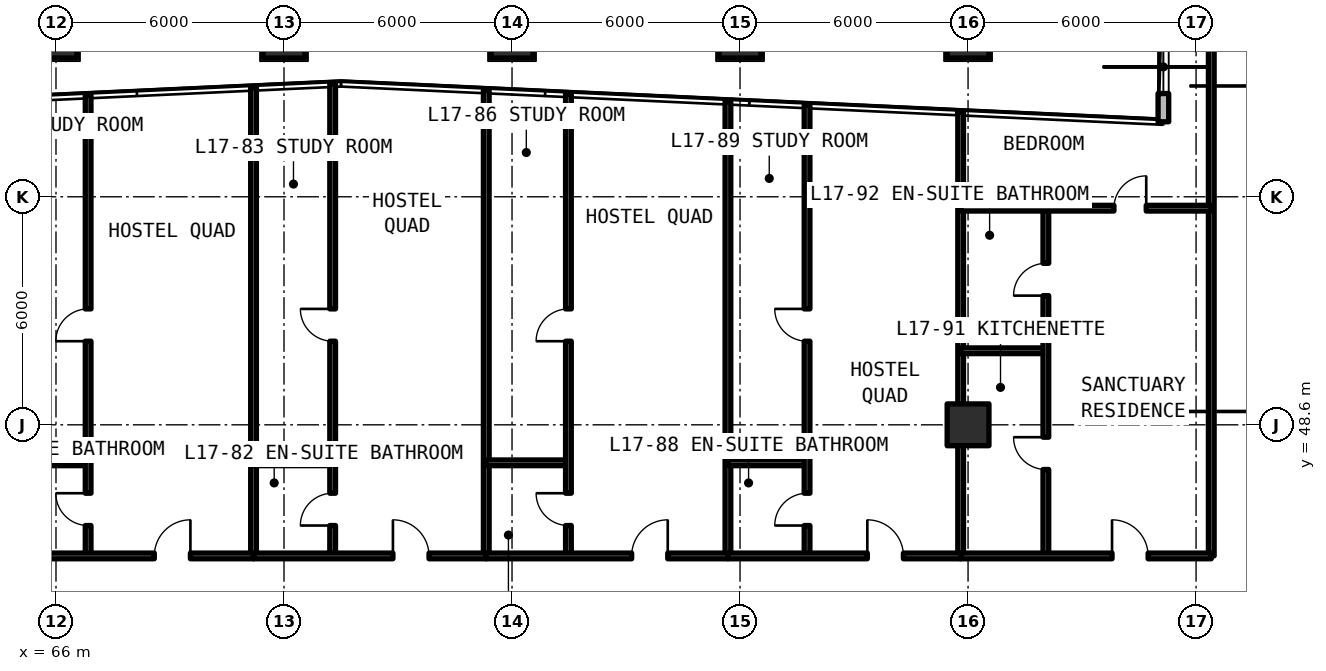
"""IFC4 building model, lengths in metres.
Left out: names, types, materials, properties, quantities, classifications, styles, units other than length and angle.
Written with IfcOpenShell. Run it as: python <this file> out.ifc"""

import sys

from ifc_helpers import new_model, si_unit, direction, frame, frame_2d, origin, origin_2d, place, context, subcontext, project, spatial, rectangle, extrude, element, fill, save


model = new_model("IFC4")
c1 = context("Model", 3, precision=1e-05, world=origin(), true_north=direction((0.0, 1.0)))
c2 = subcontext(c1, "Body", "Model", "MODEL_VIEW")
j1 = project(units=[si_unit("LENGTHUNIT", "METRE"), si_unit("PLANEANGLEUNIT", "RADIAN")], contexts=[c1])
p1 = place(None, origin())
s1 = spatial("IfcSite", under=j1, at=p1, CompositionType="ELEMENT")
p2 = place(p1, origin())
s2 = spatial("IfcBuilding", under=s1, at=p2, CompositionType="ELEMENT")
p3 = place(p2, frame((0.0, 0.0, 62.37)))
s3 = spatial("IfcBuildingStorey", under=s2, at=p3, CompositionType="ELEMENT", Elevation=62.37)
for number, where, z_axis, x_axis in (
    (1, (90.0, 48.6, 0.0), (0.0, 0.0, 1.0), (1.0, 0.0, 0.0)),
    (2, (66.0, 58.8, 0.0), (0.0, 0.0, 1.0), (1.0, 0.0, 0.0)),
    (3, (72.0, 58.8, 0.0), (0.0, 0.0, 1.0), (1.0, 0.0, 0.0)),
    (4, (78.0, 58.8, 0.0), (0.0, 0.0, 1.0), (1.0, 0.0, 0.0)),
    (5, (84.0, 58.8, 0.0), (0.0, 0.0, 1.0), (1.0, 0.0, 0.0)),
    (6, (90.0, 58.8, 0.0), (0.0, 0.0, 1.0), (1.0, 0.0, 0.0)),
):
    element("IfcColumn", number, at=place(p3, frame(where, z_axis=z_axis, x_axis=x_axis)), inside=s3, PredefinedType="COLUMN", context=c2, shape_type="SweptSolid", body=[
        extrude(rectangle(XDim=1.1, YDim=1.1, at=origin_2d()), origin(), (0.0, 0.0, 1.0), 3.63),
    ])
p4 = place(p3, frame((100.66, 55.342, 0.0), z_axis=(0.0, 0.0, 1.0), x_axis=(-0.707106781187, 0.707106781187, 0.0)))
e7 = element("IfcWall", 7, at=p4, inside=s3, PredefinedType="SOLIDWALL", context=c2, shape_type="SweptSolid", body=[
    extrude(rectangle(XDim=5.824, YDim=0.28, at=frame_2d((2.912, 0.0))), origin(), (0.0, 0.0, 1.0), 3.41),
])
p5 = place(p4, frame((1.212, 0.0, 0.78)))
e8 = element("IfcOpeningElement", 8, at=p5, cuts=e7, PredefinedType="OPENING", context=c2, shape_type="SweptSolid", body=[
    extrude(rectangle(XDim=3.4, YDim=1.66, at=frame_2d((1.7, 0.83))), frame((0.0, 0.15, 0.0), z_axis=(0.0, -1.0, 0.0), x_axis=(1.0, 0.0, 0.0)), (0.0, 0.0, 1.0), 0.3),
])
p6 = place(p3, frame((95.14, 59.46, 0.0), z_axis=(0.0, 0.0, 1.0), x_axis=(0.0, -1.0, 0.0)))
e9 = element("IfcWall", 9, at=p6, inside=s3, PredefinedType="SOLIDWALL", context=c2, shape_type="SweptSolid", body=[
    extrude(rectangle(XDim=2.887, YDim=0.28, at=frame_2d((1.443, 0.0))), origin(), (0.0, 0.0, 1.0), 3.41),
])
p7 = place(p6, frame((0.743, 0.0, 0.78)))
e10 = element("IfcOpeningElement", 10, at=p7, cuts=e9, PredefinedType="OPENING", context=c2, shape_type="SweptSolid", body=[
    extrude(rectangle(XDim=1.4, YDim=1.65, at=frame_2d((0.7, 0.825))), frame((0.0, 0.15, 0.0), z_axis=(0.0, -1.0, 0.0), x_axis=(1.0, 0.0, 0.0)), (0.0, 0.0, 1.0), 0.3),
])
p8 = place(p3, frame((96.4, 45.15, 0.0), z_axis=(0.0, 0.0, 1.0), x_axis=(0.0, 1.0, 0.0)))
e11 = element("IfcWall", 11, at=p8, inside=s3, PredefinedType="SOLIDWALL", context=c2, shape_type="SweptSolid", body=[
    extrude(rectangle(XDim=14.31, YDim=0.15, at=frame_2d((7.155, 0.0))), origin(), (0.0, 0.0, 1.0), 2.63),
])
p9 = place(p3, frame((71.198, 45.15, 0.0), z_axis=(0.0, 0.0, 1.0), x_axis=(0.0, 1.0, 0.0)))
e12 = element("IfcWall", 12, at=p9, inside=s3, PredefinedType="SOLIDWALL", context=c2, shape_type="SweptSolid", body=[
    extrude(rectangle(XDim=12.323, YDim=0.15, at=frame_2d((6.162, 0.0))), origin(), (0.0, 0.0, 1.0), 2.63),
])
p10 = place(p3, frame((64.603, 47.6, 0.0), z_axis=(0.0, 0.0, 1.0), x_axis=(1.0, 0.0, 0.0)))
e13 = element("IfcWall", 13, at=p10, inside=s3, PredefinedType="PARTITIONING", context=c2, shape_type="SweptSolid", body=[
    extrude(rectangle(XDim=2.242, YDim=0.15, at=frame_2d((1.121, 0.0))), origin(), (0.0, 0.0, 1.0), 2.63),
])
p11 = place(p3, frame((66.845, 45.15, 0.0), z_axis=(0.0, 0.0, 1.0), x_axis=(0.0, 1.0, 0.0)))
e14 = element("IfcWall", 14, at=p11, inside=s3, PredefinedType="PARTITIONING", context=c2, shape_type="SweptSolid", body=[
    extrude(rectangle(XDim=12.12, YDim=0.15, at=frame_2d((6.06, 0.0))), origin(), (0.0, 0.0, 1.0), 2.63),
])
p12 = place(p11, frame((0.8, 0.0, 0.0)))
e15 = element("IfcOpeningElement", 15, at=p12, cuts=e14, PredefinedType="OPENING", context=c2, shape_type="SweptSolid", body=[
    extrude(rectangle(XDim=0.85, YDim=2.1, at=frame_2d((0.425, 1.05))), frame((0.0, 0.085, 0.0), z_axis=(0.0, -1.0, 0.0), x_axis=(1.0, 0.0, 0.0)), (0.0, 0.0, 1.0), 0.17),
])
p13 = place(p11, frame((5.65, 0.0, 0.0)))
e16 = element("IfcOpeningElement", 16, at=p13, cuts=e14, PredefinedType="OPENING", context=c2, shape_type="SweptSolid", body=[
    extrude(rectangle(XDim=0.85, YDim=2.1, at=frame_2d((0.425, 1.05))), frame((0.0, 0.085, 0.0), z_axis=(0.0, -1.0, 0.0), x_axis=(1.0, 0.0, 0.0)), (0.0, 0.0, 1.0), 0.17),
])
p14 = place(p3, frame((64.603, 45.15, 0.0), z_axis=(0.0, 0.0, 1.0), x_axis=(1.0, 0.0, 0.0)))
e17 = element("IfcWall", 17, at=p14, inside=s3, PredefinedType="SOLIDWALL", context=c2, shape_type="SweptSolid", body=[
    extrude(rectangle(XDim=6.595, YDim=0.15, at=frame_2d((3.297, 0.0))), origin(), (0.0, 0.0, 1.0), 2.63),
])
p15 = place(p14, frame((3.984, 0.0, 0.0)))
e18 = element("IfcOpeningElement", 18, at=p15, cuts=e17, PredefinedType="OPENING", context=c2, shape_type="SweptSolid", body=[
    extrude(rectangle(XDim=0.95, YDim=2.15, at=frame_2d((0.475, 1.075))), frame((0.0, 0.085, 0.0), z_axis=(0.0, -1.0, 0.0), x_axis=(1.0, 0.0, 0.0)), (0.0, 0.0, 1.0), 0.17),
])
p16 = place(p3, frame((77.322, 45.15, 0.0), z_axis=(0.0, 0.0, 1.0), x_axis=(0.0, 1.0, 0.0)))
e19 = element("IfcWall", 19, at=p16, inside=s3, PredefinedType="SOLIDWALL", context=c2, shape_type="SweptSolid", body=[
    extrude(rectangle(XDim=12.252, YDim=0.15, at=frame_2d((6.126, 0.0))), origin(), (0.0, 0.0, 1.0), 2.63),
])
p17 = place(p3, frame((71.198, 47.6, 0.0), z_axis=(0.0, 0.0, 1.0), x_axis=(1.0, 0.0, 0.0)))
e20 = element("IfcWall", 20, at=p17, inside=s3, PredefinedType="PARTITIONING", context=c2, shape_type="SweptSolid", body=[
    extrude(rectangle(XDim=2.082, YDim=0.15, at=frame_2d((1.041, 0.0))), origin(), (0.0, 0.0, 1.0), 2.63),
])
p18 = place(p3, frame((73.28, 45.15, 0.0), z_axis=(0.0, 0.0, 1.0), x_axis=(0.0, 1.0, 0.0)))
e21 = element("IfcWall", 21, at=p18, inside=s3, PredefinedType="PARTITIONING", context=c2, shape_type="SweptSolid", body=[
    extrude(rectangle(XDim=12.42, YDim=0.15, at=frame_2d((6.21, 0.0))), origin(), (0.0, 0.0, 1.0), 2.63),
])
p19 = place(p18, frame((0.8, 0.0, 0.0)))
e22 = element("IfcOpeningElement", 22, at=p19, cuts=e21, PredefinedType="OPENING", context=c2, shape_type="SweptSolid", body=[
    extrude(rectangle(XDim=0.85, YDim=2.1, at=frame_2d((0.425, 1.05))), frame((0.0, 0.085, 0.0), z_axis=(0.0, -1.0, 0.0), x_axis=(1.0, 0.0, 0.0)), (0.0, 0.0, 1.0), 0.17),
])
p20 = place(p18, frame((5.65, 0.0, 0.0)))
e23 = element("IfcOpeningElement", 23, at=p20, cuts=e21, PredefinedType="OPENING", context=c2, shape_type="SweptSolid", body=[
    extrude(rectangle(XDim=0.85, YDim=2.1, at=frame_2d((0.425, 1.05))), frame((0.0, 0.085, 0.0), z_axis=(0.0, -1.0, 0.0), x_axis=(1.0, 0.0, 0.0)), (0.0, 0.0, 1.0), 0.17),
])
p21 = place(p3, frame((71.198, 45.15, 0.0), z_axis=(0.0, 0.0, 1.0), x_axis=(1.0, 0.0, 0.0)))
e24 = element("IfcWall", 24, at=p21, inside=s3, PredefinedType="SOLIDWALL", context=c2, shape_type="SweptSolid", body=[
    extrude(rectangle(XDim=6.124, YDim=0.15, at=frame_2d((3.062, 0.0))), origin(), (0.0, 0.0, 1.0), 2.63),
])
p22 = place(p21, frame((3.668, 0.0, 0.0)))
e25 = element("IfcOpeningElement", 25, at=p22, cuts=e24, PredefinedType="OPENING", context=c2, shape_type="SweptSolid", body=[
    extrude(rectangle(XDim=0.95, YDim=2.15, at=frame_2d((0.475, 1.075))), frame((0.0, 0.085, 0.0), z_axis=(0.0, -1.0, 0.0), x_axis=(1.0, 0.0, 0.0)), (0.0, 0.0, 1.0), 0.17),
])
p23 = place(p3, frame((83.681, 45.15, 0.0), z_axis=(0.0, 0.0, 1.0), x_axis=(0.0, 1.0, 0.0)))
e26 = element("IfcWall", 26, at=p23, inside=s3, PredefinedType="SOLIDWALL", context=c2, shape_type="SweptSolid", body=[
    extrude(rectangle(XDim=11.956, YDim=0.15, at=frame_2d((5.978, 0.0))), origin(), (0.0, 0.0, 1.0), 2.63),
])
p24 = place(p3, frame((77.322, 47.6, 0.0), z_axis=(0.0, 0.0, 1.0), x_axis=(1.0, 0.0, 0.0)))
e27 = element("IfcWall", 27, at=p24, inside=s3, PredefinedType="PARTITIONING", context=c2, shape_type="SweptSolid", body=[
    extrude(rectangle(XDim=2.162, YDim=0.15, at=frame_2d((1.081, 0.0))), origin(), (0.0, 0.0, 1.0), 2.63),
])
p25 = place(p3, frame((79.484, 45.15, 0.0), z_axis=(0.0, 0.0, 1.0), x_axis=(0.0, 1.0, 0.0)))
e28 = element("IfcWall", 28, at=p25, inside=s3, PredefinedType="PARTITIONING", context=c2, shape_type="SweptSolid", body=[
    extrude(rectangle(XDim=12.152, YDim=0.15, at=frame_2d((6.076, 0.0))), origin(), (0.0, 0.0, 1.0), 2.63),
])
p26 = place(p25, frame((0.8, 0.0, 0.0)))
e29 = element("IfcOpeningElement", 29, at=p26, cuts=e28, PredefinedType="OPENING", context=c2, shape_type="SweptSolid", body=[
    extrude(rectangle(XDim=0.85, YDim=2.1, at=frame_2d((0.425, 1.05))), frame((0.0, 0.085, 0.0), z_axis=(0.0, -1.0, 0.0), x_axis=(1.0, 0.0, 0.0)), (0.0, 0.0, 1.0), 0.17),
])
p27 = place(p25, frame((5.65, 0.0, 0.0)))
e30 = element("IfcOpeningElement", 30, at=p27, cuts=e28, PredefinedType="OPENING", context=c2, shape_type="SweptSolid", body=[
    extrude(rectangle(XDim=0.85, YDim=2.1, at=frame_2d((0.425, 1.05))), frame((0.0, 0.085, 0.0), z_axis=(0.0, -1.0, 0.0), x_axis=(1.0, 0.0, 0.0)), (0.0, 0.0, 1.0), 0.17),
])
p28 = place(p3, frame((77.322, 45.15, 0.0), z_axis=(0.0, 0.0, 1.0), x_axis=(1.0, 0.0, 0.0)))
e31 = element("IfcWall", 31, at=p28, inside=s3, PredefinedType="SOLIDWALL", context=c2, shape_type="SweptSolid", body=[
    extrude(rectangle(XDim=6.359, YDim=0.15, at=frame_2d((3.18, 0.0))), origin(), (0.0, 0.0, 1.0), 2.63),
])
p29 = place(p28, frame((3.826, 0.0, 0.0)))
e32 = element("IfcOpeningElement", 32, at=p29, cuts=e31, PredefinedType="OPENING", context=c2, shape_type="SweptSolid", body=[
    extrude(rectangle(XDim=0.95, YDim=2.15, at=frame_2d((0.475, 1.075))), frame((0.0, 0.085, 0.0), z_axis=(0.0, -1.0, 0.0), x_axis=(1.0, 0.0, 0.0)), (0.0, 0.0, 1.0), 0.17),
])
p30 = place(p3, frame((89.805, 45.15, 0.0), z_axis=(0.0, 0.0, 1.0), x_axis=(0.0, 1.0, 0.0)))
e33 = element("IfcWall", 33, at=p30, inside=s3, PredefinedType="SOLIDWALL", context=c2, shape_type="SweptSolid", body=[
    extrude(rectangle(XDim=11.672, YDim=0.15, at=frame_2d((5.836, 0.0))), origin(), (0.0, 0.0, 1.0), 2.63),
])
p31 = place(p3, frame((83.681, 47.6, 0.0), z_axis=(0.0, 0.0, 1.0), x_axis=(1.0, 0.0, 0.0)))
e34 = element("IfcWall", 34, at=p31, inside=s3, PredefinedType="PARTITIONING", context=c2, shape_type="SweptSolid", body=[
    extrude(rectangle(XDim=2.082, YDim=0.15, at=frame_2d((1.041, 0.0))), origin(), (0.0, 0.0, 1.0), 2.63),
])
p32 = place(p3, frame((85.763, 45.15, 0.0), z_axis=(0.0, 0.0, 1.0), x_axis=(0.0, 1.0, 0.0)))
e35 = element("IfcWall", 35, at=p32, inside=s3, PredefinedType="PARTITIONING", context=c2, shape_type="SweptSolid", body=[
    extrude(rectangle(XDim=11.86, YDim=0.15, at=frame_2d((5.93, 0.0))), origin(), (0.0, 0.0, 1.0), 2.63),
])
p33 = place(p32, frame((0.8, 0.0, 0.0)))
e36 = element("IfcOpeningElement", 36, at=p33, cuts=e35, PredefinedType="OPENING", context=c2, shape_type="SweptSolid", body=[
    extrude(rectangle(XDim=0.85, YDim=2.1, at=frame_2d((0.425, 1.05))), frame((0.0, 0.085, 0.0), z_axis=(0.0, -1.0, 0.0), x_axis=(1.0, 0.0, 0.0)), (0.0, 0.0, 1.0), 0.17),
])
p34 = place(p32, frame((5.65, 0.0, 0.0)))
e37 = element("IfcOpeningElement", 37, at=p34, cuts=e35, PredefinedType="OPENING", context=c2, shape_type="SweptSolid", body=[
    extrude(rectangle(XDim=0.85, YDim=2.1, at=frame_2d((0.425, 1.05))), frame((0.0, 0.085, 0.0), z_axis=(0.0, -1.0, 0.0), x_axis=(1.0, 0.0, 0.0)), (0.0, 0.0, 1.0), 0.17),
])
p35 = place(p3, frame((83.681, 45.15, 0.0), z_axis=(0.0, 0.0, 1.0), x_axis=(1.0, 0.0, 0.0)))
e38 = element("IfcWall", 38, at=p35, inside=s3, PredefinedType="SOLIDWALL", context=c2, shape_type="SweptSolid", body=[
    extrude(rectangle(XDim=6.124, YDim=0.15, at=frame_2d((3.062, 0.0))), origin(), (0.0, 0.0, 1.0), 2.63),
])
p36 = place(p35, frame((3.668, 0.0, 0.0)))
e39 = element("IfcOpeningElement", 39, at=p36, cuts=e38, PredefinedType="OPENING", context=c2, shape_type="SweptSolid", body=[
    extrude(rectangle(XDim=0.95, YDim=2.15, at=frame_2d((0.475, 1.075))), frame((0.0, 0.085, 0.0), z_axis=(0.0, -1.0, 0.0), x_axis=(1.0, 0.0, 0.0)), (0.0, 0.0, 1.0), 0.17),
])
p37 = place(p3, frame((89.805, 50.549, 0.0), z_axis=(0.0, 0.0, 1.0), x_axis=(1.0, 0.0, 0.0)))
e40 = element("IfcWall", 40, at=p37, inside=s3, PredefinedType="PARTITIONING", context=c2, shape_type="SweptSolid", body=[
    extrude(rectangle(XDim=2.242, YDim=0.15, at=frame_2d((1.121, 0.0))), origin(), (0.0, 0.0, 1.0), 2.63),
])
p38 = place(p3, frame((92.047, 45.15, 0.0), z_axis=(0.0, 0.0, 1.0), x_axis=(0.0, 1.0, 0.0)))
e41 = element("IfcWall", 41, at=p38, inside=s3, PredefinedType="PARTITIONING", context=c2, shape_type="SweptSolid", body=[
    extrude(rectangle(XDim=9.15, YDim=0.15, at=frame_2d((4.575, 0.0))), origin(), (0.0, 0.0, 1.0), 2.63),
])
p39 = place(p38, frame((2.274, 0.0, 0.0)))
e42 = element("IfcOpeningElement", 42, at=p39, cuts=e41, PredefinedType="OPENING", context=c2, shape_type="SweptSolid", body=[
    extrude(rectangle(XDim=0.85, YDim=2.1, at=frame_2d((0.425, 1.05))), frame((0.0, 0.085, 0.0), z_axis=(0.0, -1.0, 0.0), x_axis=(1.0, 0.0, 0.0)), (0.0, 0.0, 1.0), 0.17),
])
p40 = place(p38, frame((6.849, 0.0, 0.0)))
e43 = element("IfcOpeningElement", 43, at=p40, cuts=e41, PredefinedType="OPENING", context=c2, shape_type="SweptSolid", body=[
    extrude(rectangle(XDim=0.85, YDim=2.1, at=frame_2d((0.425, 1.05))), frame((0.0, 0.085, 0.0), z_axis=(0.0, -1.0, 0.0), x_axis=(1.0, 0.0, 0.0)), (0.0, 0.0, 1.0), 0.17),
])
p41 = place(p3, frame((89.805, 54.3, 0.0), z_axis=(0.0, 0.0, 1.0), x_axis=(1.0, 0.0, 0.0)))
e44 = element("IfcWall", 44, at=p41, inside=s3, PredefinedType="PARTITIONING", context=c2, shape_type="SweptSolid", body=[
    extrude(rectangle(XDim=6.595, YDim=0.15, at=frame_2d((3.297, 0.0))), origin(), (0.0, 0.0, 1.0), 2.63),
])
p42 = place(p41, frame((4.034, 0.0, 0.0)))
e45 = element("IfcOpeningElement", 45, at=p42, cuts=e44, PredefinedType="OPENING", context=c2, shape_type="SweptSolid", body=[
    extrude(rectangle(XDim=0.85, YDim=2.1, at=frame_2d((0.425, 1.05))), frame((0.0, 0.085, 0.0), z_axis=(0.0, -1.0, 0.0), x_axis=(1.0, 0.0, 0.0)), (0.0, 0.0, 1.0), 0.17),
])
p43 = place(p3, frame((89.805, 45.15, 0.0), z_axis=(0.0, 0.0, 1.0), x_axis=(1.0, 0.0, 0.0)))
e46 = element("IfcWall", 46, at=p43, inside=s3, PredefinedType="SOLIDWALL", context=c2, shape_type="SweptSolid", body=[
    extrude(rectangle(XDim=6.595, YDim=0.15, at=frame_2d((3.297, 0.0))), origin(), (0.0, 0.0, 1.0), 2.63),
])
p44 = place(p43, frame((3.984, 0.0, 0.0)))
e47 = element("IfcOpeningElement", 47, at=p44, cuts=e46, PredefinedType="OPENING", context=c2, shape_type="SweptSolid", body=[
    extrude(rectangle(XDim=0.95, YDim=2.15, at=frame_2d((0.475, 1.075))), frame((0.0, 0.085, 0.0), z_axis=(0.0, -1.0, 0.0), x_axis=(1.0, 0.0, 0.0)), (0.0, 0.0, 1.0), 0.17),
])
p45 = place(p7, origin())
e48 = element("IfcWindow", 48, at=p45, inside=s3, PartitioningType="SINGLE_PANEL", PredefinedType="WINDOW", context=c2, shape_type="SweptSolid", body=[
    extrude(rectangle(XDim=1.4, YDim=1.65, at=frame_2d((0.7, 0.825))), frame((0.0, 0.03, 0.0), z_axis=(0.0, -1.0, 0.0), x_axis=(1.0, 0.0, 0.0)), (0.0, 0.0, 1.0), 0.06),
])
fill(e10, e48)
p46 = place(p12, origin())
e49 = element("IfcDoor", 49, at=p46, inside=s3, OperationType="SINGLE_SWING_RIGHT", PredefinedType="DOOR", context=c2, shape_type="SweptSolid", body=[
    extrude(rectangle(XDim=0.85, YDim=2.1, at=frame_2d((0.425, 1.05))), frame((0.0, 0.025, 0.0), z_axis=(0.0, -1.0, 0.0), x_axis=(1.0, 0.0, 0.0)), (0.0, 0.0, 1.0), 0.05),
])
fill(e15, e49)
p47 = place(p13, origin())
e50 = element("IfcDoor", 50, at=p47, inside=s3, OperationType="SINGLE_SWING_LEFT", PredefinedType="DOOR", context=c2, shape_type="SweptSolid", body=[
    extrude(rectangle(XDim=0.85, YDim=2.1, at=frame_2d((0.425, 1.05))), frame((0.0, 0.025, 0.0), z_axis=(0.0, -1.0, 0.0), x_axis=(1.0, 0.0, 0.0)), (0.0, 0.0, 1.0), 0.05),
])
fill(e16, e50)
p48 = place(p15, origin())
e51 = element("IfcDoor", 51, at=p48, inside=s3, OperationType="SINGLE_SWING_RIGHT", PredefinedType="DOOR", context=c2, shape_type="SweptSolid", body=[
    extrude(rectangle(XDim=0.95, YDim=2.15, at=frame_2d((0.475, 1.075))), frame((0.0, 0.025, 0.0), z_axis=(0.0, -1.0, 0.0), x_axis=(1.0, 0.0, 0.0)), (0.0, 0.0, 1.0), 0.05),
])
fill(e18, e51)
p49 = place(p19, origin())
e52 = element("IfcDoor", 52, at=p49, inside=s3, OperationType="SINGLE_SWING_LEFT", PredefinedType="DOOR", context=c2, shape_type="SweptSolid", body=[
    extrude(rectangle(XDim=0.85, YDim=2.1, at=frame_2d((0.425, 1.05))), frame((0.0, 0.025, 0.0), z_axis=(0.0, -1.0, 0.0), x_axis=(1.0, 0.0, 0.0)), (0.0, 0.0, 1.0), 0.05),
])
fill(e22, e52)
p50 = place(p20, origin())
e53 = element("IfcDoor", 53, at=p50, inside=s3, OperationType="SINGLE_SWING_RIGHT", PredefinedType="DOOR", context=c2, shape_type="SweptSolid", body=[
    extrude(rectangle(XDim=0.85, YDim=2.1, at=frame_2d((0.425, 1.05))), frame((0.0, 0.025, 0.0), z_axis=(0.0, -1.0, 0.0), x_axis=(1.0, 0.0, 0.0)), (0.0, 0.0, 1.0), 0.05),
])
fill(e23, e53)
p51 = place(p22, origin())
e54 = element("IfcDoor", 54, at=p51, inside=s3, OperationType="SINGLE_SWING_LEFT", PredefinedType="DOOR", context=c2, shape_type="SweptSolid", body=[
    extrude(rectangle(XDim=0.95, YDim=2.15, at=frame_2d((0.475, 1.075))), frame((0.0, 0.025, 0.0), z_axis=(0.0, -1.0, 0.0), x_axis=(1.0, 0.0, 0.0)), (0.0, 0.0, 1.0), 0.05),
])
fill(e25, e54)
p52 = place(p26, origin())
e55 = element("IfcDoor", 55, at=p52, inside=s3, OperationType="SINGLE_SWING_RIGHT", PredefinedType="DOOR", context=c2, shape_type="SweptSolid", body=[
    extrude(rectangle(XDim=0.85, YDim=2.1, at=frame_2d((0.425, 1.05))), frame((0.0, 0.025, 0.0), z_axis=(0.0, -1.0, 0.0), x_axis=(1.0, 0.0, 0.0)), (0.0, 0.0, 1.0), 0.05),
])
fill(e29, e55)
p53 = place(p27, origin())
e56 = element("IfcDoor", 56, at=p53, inside=s3, OperationType="SINGLE_SWING_LEFT", PredefinedType="DOOR", context=c2, shape_type="SweptSolid", body=[
    extrude(rectangle(XDim=0.85, YDim=2.1, at=frame_2d((0.425, 1.05))), frame((0.0, 0.025, 0.0), z_axis=(0.0, -1.0, 0.0), x_axis=(1.0, 0.0, 0.0)), (0.0, 0.0, 1.0), 0.05),
])
fill(e30, e56)
p54 = place(p29, origin())
e57 = element("IfcDoor", 57, at=p54, inside=s3, OperationType="SINGLE_SWING_RIGHT", PredefinedType="DOOR", context=c2, shape_type="SweptSolid", body=[
    extrude(rectangle(XDim=0.95, YDim=2.15, at=frame_2d((0.475, 1.075))), frame((0.0, 0.025, 0.0), z_axis=(0.0, -1.0, 0.0), x_axis=(1.0, 0.0, 0.0)), (0.0, 0.0, 1.0), 0.05),
])
fill(e32, e57)
p55 = place(p33, origin())
e58 = element("IfcDoor", 58, at=p55, inside=s3, OperationType="SINGLE_SWING_LEFT", PredefinedType="DOOR", context=c2, shape_type="SweptSolid", body=[
    extrude(rectangle(XDim=0.85, YDim=2.1, at=frame_2d((0.425, 1.05))), frame((0.0, 0.025, 0.0), z_axis=(0.0, -1.0, 0.0), x_axis=(1.0, 0.0, 0.0)), (0.0, 0.0, 1.0), 0.05),
])
fill(e36, e58)
p56 = place(p34, origin())
e59 = element("IfcDoor", 59, at=p56, inside=s3, OperationType="SINGLE_SWING_RIGHT", PredefinedType="DOOR", context=c2, shape_type="SweptSolid", body=[
    extrude(rectangle(XDim=0.85, YDim=2.1, at=frame_2d((0.425, 1.05))), frame((0.0, 0.025, 0.0), z_axis=(0.0, -1.0, 0.0), x_axis=(1.0, 0.0, 0.0)), (0.0, 0.0, 1.0), 0.05),
])
fill(e37, e59)
p57 = place(p36, origin())
e60 = element("IfcDoor", 60, at=p57, inside=s3, OperationType="SINGLE_SWING_LEFT", PredefinedType="DOOR", context=c2, shape_type="SweptSolid", body=[
    extrude(rectangle(XDim=0.95, YDim=2.15, at=frame_2d((0.475, 1.075))), frame((0.0, 0.025, 0.0), z_axis=(0.0, -1.0, 0.0), x_axis=(1.0, 0.0, 0.0)), (0.0, 0.0, 1.0), 0.05),
])
fill(e39, e60)
p58 = place(p39, origin())
e61 = element("IfcDoor", 61, at=p58, inside=s3, OperationType="SINGLE_SWING_RIGHT", PredefinedType="DOOR", context=c2, shape_type="SweptSolid", body=[
    extrude(rectangle(XDim=0.85, YDim=2.1, at=frame_2d((0.425, 1.05))), frame((0.0, 0.025, 0.0), z_axis=(0.0, -1.0, 0.0), x_axis=(1.0, 0.0, 0.0)), (0.0, 0.0, 1.0), 0.05),
])
fill(e42, e61)
p59 = place(p40, origin())
e62 = element("IfcDoor", 62, at=p59, inside=s3, OperationType="SINGLE_SWING_LEFT", PredefinedType="DOOR", context=c2, shape_type="SweptSolid", body=[
    extrude(rectangle(XDim=0.85, YDim=2.1, at=frame_2d((0.425, 1.05))), frame((0.0, 0.025, 0.0), z_axis=(0.0, -1.0, 0.0), x_axis=(1.0, 0.0, 0.0)), (0.0, 0.0, 1.0), 0.05),
])
fill(e43, e62)
p60 = place(p42, origin())
e63 = element("IfcDoor", 63, at=p60, inside=s3, OperationType="SINGLE_SWING_RIGHT", PredefinedType="DOOR", context=c2, shape_type="SweptSolid", body=[
    extrude(rectangle(XDim=0.85, YDim=2.1, at=frame_2d((0.425, 1.05))), frame((0.0, 0.025, 0.0), z_axis=(0.0, -1.0, 0.0), x_axis=(1.0, 0.0, 0.0)), (0.0, 0.0, 1.0), 0.05),
])
fill(e45, e63)
p61 = place(p44, origin())
e64 = element("IfcDoor", 64, at=p61, inside=s3, OperationType="SINGLE_SWING_LEFT", PredefinedType="DOOR", context=c2, shape_type="SweptSolid", body=[
    extrude(rectangle(XDim=0.95, YDim=2.15, at=frame_2d((0.475, 1.075))), frame((0.0, 0.025, 0.0), z_axis=(0.0, -1.0, 0.0), x_axis=(1.0, 0.0, 0.0)), (0.0, 0.0, 1.0), 0.05),
])
fill(e47, e64)
save(model, sys.argv[1])
